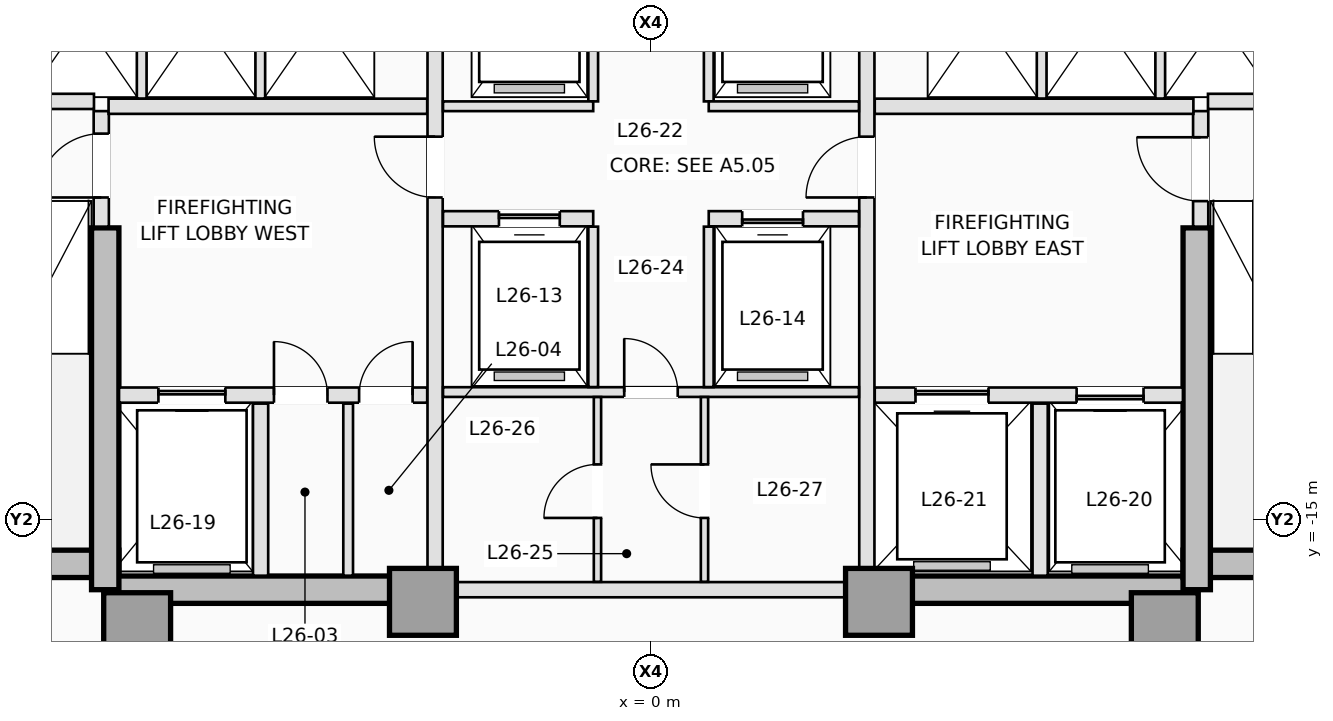
"""IFC4 building model, lengths in metres.
Left out: names, types, materials, properties, quantities, classifications, styles, units other than length and angle.
Written with IfcOpenShell. Run it as: python <this file> out.ifc"""

import sys

from ifc_helpers import new_model, si_unit, direction, frame, frame_2d, origin, origin_2d, place, context, subcontext, project, spatial, rectangle, extrude, element, fill, save


model = new_model("IFC4")
c1 = context("Model", 3, precision=1e-05, world=origin(), true_north=direction((0.0, 1.0)))
c2 = subcontext(c1, "Body", "Model", "MODEL_VIEW")
j1 = project(units=[si_unit("LENGTHUNIT", "METRE"), si_unit("PLANEANGLEUNIT", "RADIAN")], contexts=[c1])
p1 = place(None, origin())
s1 = spatial("IfcSite", under=j1, at=p1, CompositionType="ELEMENT")
p2 = place(p1, origin())
s2 = spatial("IfcBuilding", under=s1, at=p2, CompositionType="ELEMENT")
p3 = place(p2, frame((0.0, 0.0, 98.5)))
s3 = spatial("IfcBuildingStorey", under=s2, at=p3, CompositionType="ELEMENT", Elevation=98.5)
p4 = place(p3, frame((-12.65, -15.725, 0.0), z_axis=(0.0, 0.0, 1.0), x_axis=(1.0, 0.0, 0.0)))
e1 = element("IfcWall", 1, at=p4, inside=s3, PredefinedType="SHEAR", context=c2, shape_type="SweptSolid", body=[
    extrude(rectangle(XDim=3.9, YDim=0.45, at=frame_2d((1.95, 0.0))), origin(), (0.0, 0.0, 1.0), 3.5),
])
for number, where, z_axis, x_axis in (
    (2, (-8.975, -16.15, 0.0), (0.0, 0.0, 1.0), (1.0, 0.0, 0.0)),
    (3, (3.75, -16.15, 0.0), (0.0, 0.0, 1.0), (1.0, 0.0, 0.0)),
):
    element("IfcWall", number, at=place(p3, frame(where, z_axis=z_axis, x_axis=x_axis)), inside=s3, PredefinedType="SHEAR", context=c2, shape_type="SweptSolid", body=[
        extrude(rectangle(XDim=5.225, YDim=0.45, at=frame_2d((2.613, 0.0))), origin(), (0.0, 0.0, 1.0), 3.5),
    ])
p5 = place(p3, frame((8.75, -15.725, 0.0), z_axis=(0.0, 0.0, 1.0), x_axis=(1.0, 0.0, 0.0)))
e4 = element("IfcWall", 4, at=p5, inside=s3, PredefinedType="SHEAR", context=c2, shape_type="SweptSolid", body=[
    extrude(rectangle(XDim=3.9, YDim=0.45, at=frame_2d((1.95, 0.0))), origin(), (0.0, 0.0, 1.0), 3.5),
])
for number, where, z_axis, x_axis in (
    (5, (-8.975, -16.15, 0.0), (0.0, 0.0, 1.0), (0.0, 1.0, 0.0)),
    (6, (8.975, -16.15, 0.0), (0.0, 0.0, 1.0), (0.0, 1.0, 0.0)),
):
    element("IfcWall", number, at=place(p3, frame(where, z_axis=z_axis, x_axis=x_axis)), inside=s3, PredefinedType="SHEAR", context=c2, shape_type="SweptSolid", body=[
        extrude(rectangle(XDim=5.95, YDim=0.45, at=frame_2d((2.975, 0.0))), origin(), (0.0, 0.0, 1.0), 3.5),
    ])
for number, where, z_axis, x_axis in (
    (7, (-8.45, -16.75, 0.0), (0.0, 0.0, 1.0), (1.0, 0.0, 0.0)),
    (8, (-3.75, -16.35, 0.0), (0.0, 0.0, 1.0), (1.0, 0.0, 0.0)),
    (9, (3.75, -16.35, 0.0), (0.0, 0.0, 1.0), (1.0, 0.0, 0.0)),
    (10, (8.45, -16.75, 0.0), (0.0, 0.0, 1.0), (1.0, 0.0, 0.0)),
):
    element("IfcColumn", number, at=place(p3, frame(where, z_axis=z_axis, x_axis=x_axis)), inside=s3, PredefinedType="COLUMN", context=c2, shape_type="SweptSolid", body=[
        extrude(rectangle(XDim=1.1, YDim=1.1, at=origin_2d()), origin(), (0.0, 0.0, 1.0), 3.5),
    ])
p6 = place(p3, frame((-9.04, -10.18, 0.0), z_axis=(0.0, 0.0, 1.0), x_axis=(0.0, 1.0, 0.0)))
e11 = element("IfcWall", 11, at=p6, inside=s3, PredefinedType="PARTITIONING", context=c2, shape_type="SweptSolid", body=[
    extrude(rectangle(XDim=1.9, YDim=0.25, at=frame_2d((0.95, 0.0))), origin(), (0.0, 0.0, 1.0), 3.25),
])
p7 = place(p6, frame((0.48, 0.0, 0.0)))
e12 = element("IfcOpeningElement", 12, at=p7, cuts=e11, PredefinedType="OPENING", context=c2, shape_type="SweptSolid", body=[
    extrude(rectangle(XDim=1.05, YDim=2.15, at=frame_2d((0.525, 1.075))), frame((0.0, 0.135, 0.0), z_axis=(0.0, -1.0, 0.0), x_axis=(1.0, 0.0, 0.0)), (0.0, 0.0, 1.0), 0.27),
])
p8 = place(p3, frame((9.04, -10.18, 0.0), z_axis=(0.0, 0.0, 1.0), x_axis=(0.0, 1.0, 0.0)))
e13 = element("IfcWall", 13, at=p8, inside=s3, PredefinedType="PARTITIONING", context=c2, shape_type="SweptSolid", body=[
    extrude(rectangle(XDim=1.9, YDim=0.25, at=frame_2d((0.95, 0.0))), origin(), (0.0, 0.0, 1.0), 3.25),
])
p9 = place(p8, frame((0.42, 0.0, 0.0)))
e14 = element("IfcOpeningElement", 14, at=p9, cuts=e13, PredefinedType="OPENING", context=c2, shape_type="SweptSolid", body=[
    extrude(rectangle(XDim=1.05, YDim=2.15, at=frame_2d((0.525, 1.075))), frame((0.0, 0.135, 0.0), z_axis=(0.0, -1.0, 0.0), x_axis=(1.0, 0.0, 0.0)), (0.0, 0.0, 1.0), 0.27),
])
for number, where, z_axis, x_axis in (
    (15, (-12.38, -8.12, 0.0), (0.0, 0.0, 1.0), (1.0, 0.0, 0.0)),
    (16, (9.16, -8.12, 0.0), (0.0, 0.0, 1.0), (1.0, 0.0, 0.0)),
):
    element("IfcWall", number, at=place(p3, frame(where, z_axis=z_axis, x_axis=x_axis)), inside=s3, PredefinedType="PARTITIONING", context=c2, shape_type="SweptSolid", body=[
        extrude(rectangle(XDim=3.22, YDim=0.25, at=frame_2d((1.61, 0.0))), origin(), (0.0, 0.0, 1.0), 3.25),
    ])
p10 = place(p3, frame((-8.748, -12.95, 0.0), z_axis=(0.0, 0.0, 1.0), x_axis=(1.0, 0.0, 0.0)))
e17 = element("IfcWall", 17, at=p10, inside=s3, PredefinedType="PARTITIONING", context=c2, shape_type="SweptSolid", body=[
    extrude(rectangle(XDim=5.068, YDim=0.25, at=frame_2d((2.534, 0.0))), origin(), (0.0, 0.0, 1.0), 3.25),
])
p11 = place(p10, frame((0.648, 0.0, 0.0)))
e18 = element("IfcOpeningElement", 18, at=p11, cuts=e17, PredefinedType="OPENING", context=c2, shape_type="SweptSolid", body=[
    extrude(rectangle(XDim=1.1, YDim=2.15, at=frame_2d((0.55, 1.075))), frame((0.0, 0.135, 0.0), z_axis=(0.0, -1.0, 0.0), x_axis=(1.0, 0.0, 0.0)), (0.0, 0.0, 1.0), 0.27),
])
p12 = place(p10, frame((2.548, 0.0, 0.0)))
e19 = element("IfcOpeningElement", 19, at=p12, cuts=e17, PredefinedType="OPENING", context=c2, shape_type="SweptSolid", body=[
    extrude(rectangle(XDim=0.88, YDim=2.1, at=frame_2d((0.44, 1.05))), frame((0.0, 0.135, 0.0), z_axis=(0.0, -1.0, 0.0), x_axis=(1.0, 0.0, 0.0)), (0.0, 0.0, 1.0), 0.27),
])
p13 = place(p10, frame((3.948, 0.0, 0.0)))
e20 = element("IfcOpeningElement", 20, at=p13, cuts=e17, PredefinedType="OPENING", context=c2, shape_type="SweptSolid", body=[
    extrude(rectangle(XDim=0.88, YDim=2.1, at=frame_2d((0.44, 1.05))), frame((0.0, 0.135, 0.0), z_axis=(0.0, -1.0, 0.0), x_axis=(1.0, 0.0, 0.0)), (0.0, 0.0, 1.0), 0.27),
])
p14 = place(p3, frame((3.68, -12.95, 0.0), z_axis=(0.0, 0.0, 1.0), x_axis=(1.0, 0.0, 0.0)))
e21 = element("IfcWall", 21, at=p14, inside=s3, PredefinedType="PARTITIONING", context=c2, shape_type="SweptSolid", body=[
    extrude(rectangle(XDim=5.068, YDim=0.25, at=frame_2d((2.534, 0.0))), origin(), (0.0, 0.0, 1.0), 3.25),
])
p15 = place(p14, frame((3.32, 0.0, 0.0)))
e22 = element("IfcOpeningElement", 22, at=p15, cuts=e21, PredefinedType="OPENING", context=c2, shape_type="SweptSolid", body=[
    extrude(rectangle(XDim=1.1, YDim=2.15, at=frame_2d((0.55, 1.075))), frame((0.0, 0.135, 0.0), z_axis=(0.0, -1.0, 0.0), x_axis=(1.0, 0.0, 0.0)), (0.0, 0.0, 1.0), 0.27),
])
p16 = place(p14, frame((0.67, 0.0, 0.0)))
e23 = element("IfcOpeningElement", 23, at=p16, cuts=e21, PredefinedType="OPENING", context=c2, shape_type="SweptSolid", body=[
    extrude(rectangle(XDim=1.2, YDim=2.15, at=frame_2d((0.6, 1.075))), frame((0.0, 0.135, 0.0), z_axis=(0.0, -1.0, 0.0), x_axis=(1.0, 0.0, 0.0)), (0.0, 0.0, 1.0), 0.27),
])
p17 = place(p3, frame((-6.42, -15.92, 0.0), z_axis=(0.0, 0.0, 1.0), x_axis=(0.0, 1.0, 0.0)))
e24 = element("IfcWall", 24, at=p17, inside=s3, PredefinedType="PARTITIONING", context=c2, shape_type="SweptSolid", body=[
    extrude(rectangle(XDim=2.83, YDim=0.25, at=frame_2d((1.415, 0.0))), origin(), (0.0, 0.0, 1.0), 3.25),
])
p18 = place(p3, frame((-4.98, -15.92, 0.0), z_axis=(0.0, 0.0, 1.0), x_axis=(0.0, 1.0, 0.0)))
e25 = element("IfcWall", 25, at=p18, inside=s3, PredefinedType="PARTITIONING", context=c2, shape_type="SweptSolid", body=[
    extrude(rectangle(XDim=2.83, YDim=0.16, at=frame_2d((1.415, 0.0))), origin(), (0.0, 0.0, 1.0), 3.25),
])
p19 = place(p3, frame((6.4, -15.92, 0.0), z_axis=(0.0, 0.0, 1.0), x_axis=(0.0, 1.0, 0.0)))
e26 = element("IfcWall", 26, at=p19, inside=s3, PredefinedType="PARTITIONING", context=c2, shape_type="SweptSolid", body=[
    extrude(rectangle(XDim=2.83, YDim=0.25, at=frame_2d((1.415, 0.0))), origin(), (0.0, 0.0, 1.0), 3.25),
])
for number, where, z_axis, x_axis in (
    (27, (-8.92, -8.2, 0.0), (0.0, 0.0, 1.0), (1.0, 0.0, 0.0)),
    (28, (3.68, -8.2, 0.0), (0.0, 0.0, 1.0), (1.0, 0.0, 0.0)),
):
    element("IfcWall", number, at=place(p3, frame(where, z_axis=z_axis, x_axis=x_axis)), inside=s3, PredefinedType="PARTITIONING", context=c2, shape_type="SweptSolid", body=[
        extrude(rectangle(XDim=5.24, YDim=0.25, at=frame_2d((2.62, 0.0))), origin(), (0.0, 0.0, 1.0), 3.25),
    ])
p20 = place(p3, frame((-3.55, -15.798, 0.0), z_axis=(0.0, 0.0, 1.0), x_axis=(0.0, 1.0, 0.0)))
e29 = element("IfcWall", 29, at=p20, inside=s3, PredefinedType="PARTITIONING", context=c2, shape_type="SweptSolid", body=[
    extrude(rectangle(XDim=10.446, YDim=0.25, at=frame_2d((5.223, 0.0))), origin(), (0.0, 0.0, 1.0), 3.25),
])
p21 = place(p20, frame((6.098, 0.0, 0.0)))
e30 = element("IfcOpeningElement", 30, at=p21, cuts=e29, PredefinedType="OPENING", context=c2, shape_type="SweptSolid", body=[
    extrude(rectangle(XDim=1.0, YDim=2.15, at=frame_2d((0.5, 1.075))), frame((0.0, 0.135, 0.0), z_axis=(0.0, -1.0, 0.0), x_axis=(1.0, 0.0, 0.0)), (0.0, 0.0, 1.0), 0.27),
])
p22 = place(p3, frame((3.55, -15.798, 0.0), z_axis=(0.0, 0.0, 1.0), x_axis=(0.0, 1.0, 0.0)))
e31 = element("IfcWall", 31, at=p22, inside=s3, PredefinedType="PARTITIONING", context=c2, shape_type="SweptSolid", body=[
    extrude(rectangle(XDim=10.446, YDim=0.25, at=frame_2d((5.223, 0.0))), origin(), (0.0, 0.0, 1.0), 3.25),
])
p23 = place(p22, frame((6.098, 0.0, 0.0)))
e32 = element("IfcOpeningElement", 32, at=p23, cuts=e31, PredefinedType="OPENING", context=c2, shape_type="SweptSolid", body=[
    extrude(rectangle(XDim=1.0, YDim=2.15, at=frame_2d((0.5, 1.075))), frame((0.0, 0.135, 0.0), z_axis=(0.0, -1.0, 0.0), x_axis=(1.0, 0.0, 0.0)), (0.0, 0.0, 1.0), 0.27),
])
for number, where, z_axis, x_axis in (
    (33, (-8.375, -8.073, 0.0), (0.0, 0.0, 1.0), (0.0, 1.0, 0.0)),
    (34, (-6.425, -8.073, 0.0), (0.0, 0.0, 1.0), (0.0, 1.0, 0.0)),
    (35, (6.425, -8.073, 0.0), (0.0, 0.0, 1.0), (0.0, 1.0, 0.0)),
    (36, (8.375, -8.073, 0.0), (0.0, 0.0, 1.0), (0.0, 1.0, 0.0)),
):
    element("IfcWall", number, at=place(p3, frame(where, z_axis=z_axis, x_axis=x_axis)), inside=s3, PredefinedType="PARTITIONING", context=c2, shape_type="SweptSolid", body=[
        extrude(rectangle(XDim=2.733, YDim=0.16, at=frame_2d((1.366, 0.0))), origin(), (0.0, 0.0, 1.0), 3.25),
    ])
p24 = place(p3, frame((-3.198, -16.15, 0.0), z_axis=(0.0, 0.0, 1.0), x_axis=(1.0, 0.0, 0.0)))
e37 = element("IfcWall", 37, at=p24, inside=s3, PredefinedType="PARTITIONING", context=c2, shape_type="SweptSolid", body=[
    extrude(rectangle(XDim=6.396, YDim=0.25, at=frame_2d((3.198, 0.0))), origin(), (0.0, 0.0, 1.0), 2.3),
])
for number, where, z_axis, x_axis in (
    (38, (-0.95, -8.12, 0.0), (0.0, 0.0, 1.0), (0.0, 1.0, 0.0)),
    (39, (0.95, -8.12, 0.0), (0.0, 0.0, 1.0), (0.0, 1.0, 0.0)),
):
    element("IfcWall", number, at=place(p3, frame(where, z_axis=z_axis, x_axis=x_axis)), inside=s3, PredefinedType="PARTITIONING", context=c2, shape_type="SweptSolid", body=[
        extrude(rectangle(XDim=2.78, YDim=0.16, at=frame_2d((1.39, 0.0))), origin(), (0.0, 0.0, 1.0), 3.25),
    ])
for number, where, z_axis, x_axis in (
    (40, (-3.42, -8.2, 0.0), (0.0, 0.0, 1.0), (1.0, 0.0, 0.0)),
    (41, (0.95, -8.2, 0.0), (0.0, 0.0, 1.0), (1.0, 0.0, 0.0)),
):
    element("IfcWall", number, at=place(p3, frame(where, z_axis=z_axis, x_axis=x_axis)), inside=s3, PredefinedType="PARTITIONING", context=c2, shape_type="SweptSolid", body=[
        extrude(rectangle(XDim=2.47, YDim=0.16, at=frame_2d((1.235, 0.0))), origin(), (0.0, 0.0, 1.0), 3.25),
    ])
p25 = place(p3, frame((-3.42, -10.05, 0.0), z_axis=(0.0, 0.0, 1.0), x_axis=(1.0, 0.0, 0.0)))
e42 = element("IfcWall", 42, at=p25, inside=s3, PredefinedType="PARTITIONING", context=c2, shape_type="SweptSolid", body=[
    extrude(rectangle(XDim=2.47, YDim=0.25, at=frame_2d((1.235, 0.0))), origin(), (0.0, 0.0, 1.0), 3.25),
])
p26 = place(p25, frame((0.92, 0.0, 0.0)))
e43 = element("IfcOpeningElement", 43, at=p26, cuts=e42, PredefinedType="OPENING", context=c2, shape_type="SweptSolid", body=[
    extrude(rectangle(XDim=1.0, YDim=2.15, at=frame_2d((0.5, 1.075))), frame((0.0, 0.135, 0.0), z_axis=(0.0, -1.0, 0.0), x_axis=(1.0, 0.0, 0.0)), (0.0, 0.0, 1.0), 0.27),
])
p27 = place(p3, frame((0.95, -10.05, 0.0), z_axis=(0.0, 0.0, 1.0), x_axis=(1.0, 0.0, 0.0)))
e44 = element("IfcWall", 44, at=p27, inside=s3, PredefinedType="PARTITIONING", context=c2, shape_type="SweptSolid", body=[
    extrude(rectangle(XDim=2.47, YDim=0.25, at=frame_2d((1.235, 0.0))), origin(), (0.0, 0.0, 1.0), 3.25),
])
p28 = place(p27, frame((0.55, 0.0, 0.0)))
e45 = element("IfcOpeningElement", 45, at=p28, cuts=e44, PredefinedType="OPENING", context=c2, shape_type="SweptSolid", body=[
    extrude(rectangle(XDim=1.0, YDim=2.15, at=frame_2d((0.5, 1.075))), frame((0.0, 0.135, 0.0), z_axis=(0.0, -1.0, 0.0), x_axis=(1.0, 0.0, 0.0)), (0.0, 0.0, 1.0), 0.27),
])
p29 = place(p3, frame((-3.42, -12.9, 0.0), z_axis=(0.0, 0.0, 1.0), x_axis=(1.0, 0.0, 0.0)))
e46 = element("IfcWall", 46, at=p29, inside=s3, PredefinedType="PARTITIONING", context=c2, shape_type="SweptSolid", body=[
    extrude(rectangle(XDim=6.84, YDim=0.16, at=frame_2d((3.42, 0.0))), origin(), (0.0, 0.0, 1.0), 3.25),
])
p30 = place(p29, frame((2.98, 0.0, 0.0)))
e47 = element("IfcOpeningElement", 47, at=p30, cuts=e46, PredefinedType="OPENING", context=c2, shape_type="SweptSolid", body=[
    extrude(rectangle(XDim=0.88, YDim=2.12, at=frame_2d((0.44, 1.06))), frame((0.0, 0.09, 0.0), z_axis=(0.0, -1.0, 0.0), x_axis=(1.0, 0.0, 0.0)), (0.0, 0.0, 1.0), 0.18),
])
for number, where, z_axis, x_axis in (
    (48, (-0.95, -12.818, 0.0), (0.0, 0.0, 1.0), (0.0, 1.0, 0.0)),
    (49, (0.95, -12.818, 0.0), (0.0, 0.0, 1.0), (0.0, 1.0, 0.0)),
):
    element("IfcWall", number, at=place(p3, frame(where, z_axis=z_axis, x_axis=x_axis)), inside=s3, PredefinedType="PARTITIONING", context=c2, shape_type="SweptSolid", body=[
        extrude(rectangle(XDim=2.638, YDim=0.16, at=frame_2d((1.319, 0.0))), origin(), (0.0, 0.0, 1.0), 3.25),
    ])
p31 = place(p3, frame((-0.88, -16.02, 0.0), z_axis=(0.0, 0.0, 1.0), x_axis=(0.0, 1.0, 0.0)))
e50 = element("IfcWall", 50, at=p31, inside=s3, PredefinedType="PARTITIONING", context=c2, shape_type="SweptSolid", body=[
    extrude(rectangle(XDim=3.038, YDim=0.12, at=frame_2d((1.519, 0.0))), origin(), (0.0, 0.0, 1.0), 3.25),
])
p32 = place(p31, frame((1.05, 0.0, 0.0)))
e51 = element("IfcOpeningElement", 51, at=p32, cuts=e50, PredefinedType="OPENING", context=c2, shape_type="SweptSolid", body=[
    extrude(rectangle(XDim=0.88, YDim=2.12, at=frame_2d((0.44, 1.06))), frame((0.0, 0.07, 0.0), z_axis=(0.0, -1.0, 0.0), x_axis=(1.0, 0.0, 0.0)), (0.0, 0.0, 1.0), 0.14),
])
p33 = place(p3, frame((0.88, -16.02, 0.0), z_axis=(0.0, 0.0, 1.0), x_axis=(0.0, 1.0, 0.0)))
e52 = element("IfcWall", 52, at=p33, inside=s3, PredefinedType="PARTITIONING", context=c2, shape_type="SweptSolid", body=[
    extrude(rectangle(XDim=3.038, YDim=0.12, at=frame_2d((1.519, 0.0))), origin(), (0.0, 0.0, 1.0), 3.25),
])
p34 = place(p33, frame((1.05, 0.0, 0.0)))
e53 = element("IfcOpeningElement", 53, at=p34, cuts=e52, PredefinedType="OPENING", context=c2, shape_type="SweptSolid", body=[
    extrude(rectangle(XDim=0.88, YDim=2.12, at=frame_2d((0.44, 1.06))), frame((0.0, 0.07, 0.0), z_axis=(0.0, -1.0, 0.0), x_axis=(1.0, 0.0, 0.0)), (0.0, 0.0, 1.0), 0.14),
])
p35 = place(p11, origin())
e54 = element("IfcDoor", 54, at=p35, inside=s3, OperationType="SLIDING_TO_LEFT", PredefinedType="DOOR", context=c2, shape_type="SweptSolid", body=[
    extrude(rectangle(XDim=1.1, YDim=2.15, at=frame_2d((0.55, 1.075))), frame((0.0, 0.025, 0.0), z_axis=(0.0, -1.0, 0.0), x_axis=(1.0, 0.0, 0.0)), (0.0, 0.0, 1.0), 0.05),
])
fill(e18, e54)
p36 = place(p15, origin())
e55 = element("IfcDoor", 55, at=p36, inside=s3, OperationType="SLIDING_TO_RIGHT", PredefinedType="DOOR", context=c2, shape_type="SweptSolid", body=[
    extrude(rectangle(XDim=1.1, YDim=2.15, at=frame_2d((0.55, 1.075))), frame((0.0, 0.025, 0.0), z_axis=(0.0, -1.0, 0.0), x_axis=(1.0, 0.0, 0.0)), (0.0, 0.0, 1.0), 0.05),
])
fill(e22, e55)
p37 = place(p16, origin())
e56 = element("IfcDoor", 56, at=p37, inside=s3, OperationType="SLIDING_TO_LEFT", PredefinedType="DOOR", context=c2, shape_type="SweptSolid", body=[
    extrude(rectangle(XDim=1.2, YDim=2.15, at=frame_2d((0.6, 1.075))), frame((0.0, 0.025, 0.0), z_axis=(0.0, -1.0, 0.0), x_axis=(1.0, 0.0, 0.0)), (0.0, 0.0, 1.0), 0.05),
])
fill(e23, e56)
p38 = place(p26, origin())
e57 = element("IfcDoor", 57, at=p38, inside=s3, OperationType="SLIDING_TO_LEFT", PredefinedType="DOOR", context=c2, shape_type="SweptSolid", body=[
    extrude(rectangle(XDim=1.0, YDim=2.15, at=frame_2d((0.5, 1.075))), frame((0.0, 0.025, 0.0), z_axis=(0.0, -1.0, 0.0), x_axis=(1.0, 0.0, 0.0)), (0.0, 0.0, 1.0), 0.05),
])
fill(e43, e57)
p39 = place(p28, origin())
e58 = element("IfcDoor", 58, at=p39, inside=s3, OperationType="SLIDING_TO_RIGHT", PredefinedType="DOOR", context=c2, shape_type="SweptSolid", body=[
    extrude(rectangle(XDim=1.0, YDim=2.15, at=frame_2d((0.5, 1.075))), frame((0.0, 0.025, 0.0), z_axis=(0.0, -1.0, 0.0), x_axis=(1.0, 0.0, 0.0)), (0.0, 0.0, 1.0), 0.05),
])
fill(e45, e58)
p40 = place(p7, origin())
e59 = element("IfcDoor", 59, at=p40, inside=s3, OperationType="SINGLE_SWING_LEFT", PredefinedType="DOOR", context=c2, shape_type="SweptSolid", body=[
    extrude(rectangle(XDim=1.05, YDim=2.15, at=frame_2d((0.525, 1.075))), frame((0.0, 0.025, 0.0), z_axis=(0.0, -1.0, 0.0), x_axis=(1.0, 0.0, 0.0)), (0.0, 0.0, 1.0), 0.05),
])
fill(e12, e59)
p41 = place(p9, origin())
e60 = element("IfcDoor", 60, at=p41, inside=s3, OperationType="SINGLE_SWING_RIGHT", PredefinedType="DOOR", context=c2, shape_type="SweptSolid", body=[
    extrude(rectangle(XDim=1.05, YDim=2.15, at=frame_2d((0.525, 1.075))), frame((0.0, 0.025, 0.0), z_axis=(0.0, -1.0, 0.0), x_axis=(1.0, 0.0, 0.0)), (0.0, 0.0, 1.0), 0.05),
])
fill(e14, e60)
p42 = place(p12, origin())
e61 = element("IfcDoor", 61, at=p42, inside=s3, OperationType="SINGLE_SWING_LEFT", PredefinedType="TRAPDOOR", context=c2, shape_type="SweptSolid", body=[
    extrude(rectangle(XDim=0.88, YDim=2.1, at=frame_2d((0.44, 1.05))), frame((0.0, 0.025, 0.0), z_axis=(0.0, -1.0, 0.0), x_axis=(1.0, 0.0, 0.0)), (0.0, 0.0, 1.0), 0.05),
])
fill(e19, e61)
p43 = place(p13, origin())
e62 = element("IfcDoor", 62, at=p43, inside=s3, OperationType="SINGLE_SWING_RIGHT", PredefinedType="TRAPDOOR", context=c2, shape_type="SweptSolid", body=[
    extrude(rectangle(XDim=0.88, YDim=2.1, at=frame_2d((0.44, 1.05))), frame((0.0, 0.025, 0.0), z_axis=(0.0, -1.0, 0.0), x_axis=(1.0, 0.0, 0.0)), (0.0, 0.0, 1.0), 0.05),
])
fill(e20, e62)
p44 = place(p21, origin())
e63 = element("IfcDoor", 63, at=p44, inside=s3, OperationType="SINGLE_SWING_RIGHT", PredefinedType="DOOR", context=c2, shape_type="SweptSolid", body=[
    extrude(rectangle(XDim=1.0, YDim=2.15, at=frame_2d((0.5, 1.075))), frame((0.0, 0.025, 0.0), z_axis=(0.0, -1.0, 0.0), x_axis=(1.0, 0.0, 0.0)), (0.0, 0.0, 1.0), 0.05),
])
fill(e30, e63)
p45 = place(p23, origin())
e64 = element("IfcDoor", 64, at=p45, inside=s3, OperationType="SINGLE_SWING_LEFT", PredefinedType="DOOR", context=c2, shape_type="SweptSolid", body=[
    extrude(rectangle(XDim=1.0, YDim=2.15, at=frame_2d((0.5, 1.075))), frame((0.0, 0.025, 0.0), z_axis=(0.0, -1.0, 0.0), x_axis=(1.0, 0.0, 0.0)), (0.0, 0.0, 1.0), 0.05),
])
fill(e32, e64)
p46 = place(p30, origin())
e65 = element("IfcDoor", 65, at=p46, inside=s3, OperationType="SINGLE_SWING_LEFT", PredefinedType="DOOR", context=c2, shape_type="SweptSolid", body=[
    extrude(rectangle(XDim=0.88, YDim=2.12, at=frame_2d((0.44, 1.06))), frame((0.0, 0.025, 0.0), z_axis=(0.0, -1.0, 0.0), x_axis=(1.0, 0.0, 0.0)), (0.0, 0.0, 1.0), 0.05),
])
fill(e47, e65)
p47 = place(p32, origin())
e66 = element("IfcDoor", 66, at=p47, inside=s3, OperationType="SINGLE_SWING_LEFT", PredefinedType="DOOR", context=c2, shape_type="SweptSolid", body=[
    extrude(rectangle(XDim=0.88, YDim=2.12, at=frame_2d((0.44, 1.06))), frame((0.0, 0.025, 0.0), z_axis=(0.0, -1.0, 0.0), x_axis=(1.0, 0.0, 0.0)), (0.0, 0.0, 1.0), 0.05),
])
fill(e51, e66)
p48 = place(p34, origin())
e67 = element("IfcDoor", 67, at=p48, inside=s3, OperationType="SINGLE_SWING_RIGHT", PredefinedType="DOOR", context=c2, shape_type="SweptSolid", body=[
    extrude(rectangle(XDim=0.88, YDim=2.12, at=frame_2d((0.44, 1.06))), frame((0.0, 0.025, 0.0), z_axis=(0.0, -1.0, 0.0), x_axis=(1.0, 0.0, 0.0)), (0.0, 0.0, 1.0), 0.05),
])
fill(e53, e67)
save(model, sys.argv[1])
